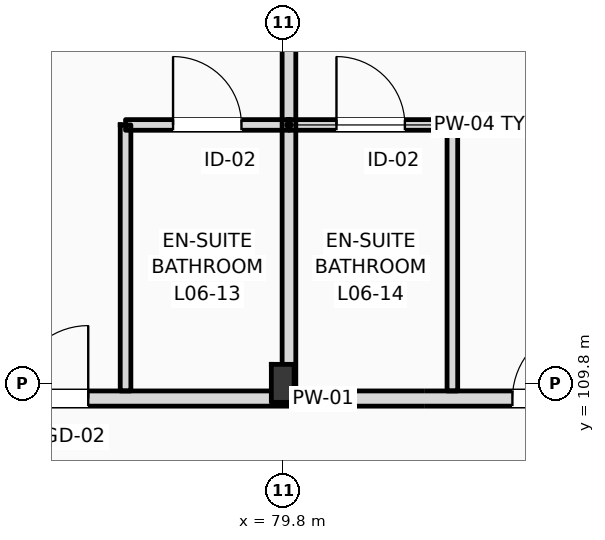
"""IFC4 building model, lengths in metres.
Left out: names, types, materials, properties, quantities, classifications, styles, units other than length and angle.
Written with IfcOpenShell. Run it as: python <this file> out.ifc"""

import sys

from ifc_helpers import new_model, si_unit, direction, frame, frame_2d, origin, origin_2d, place, context, subcontext, project, spatial, rectangle, i_section, extrude, element, fill, save


model = new_model("IFC4")
c1 = context("Model", 3, precision=1e-05, world=origin(), true_north=direction((0.0, 1.0)))
c2 = subcontext(c1, "Body", "Model", "MODEL_VIEW")
j1 = project(units=[si_unit("LENGTHUNIT", "METRE"), si_unit("PLANEANGLEUNIT", "RADIAN")], contexts=[c1])
p1 = place(None, origin())
s1 = spatial("IfcSite", under=j1, at=p1, CompositionType="ELEMENT")
p2 = place(p1, origin())
s2 = spatial("IfcBuilding", under=s1, at=p2, CompositionType="ELEMENT")
p3 = place(p2, frame((0.0, 0.0, 28.2)))
s3 = spatial("IfcBuildingStorey", under=s2, at=p3, CompositionType="ELEMENT", Elevation=28.2)
p4 = place(p3, frame((79.8, 109.8, 0.0), z_axis=(0.0, 0.0, 1.0), x_axis=(1.0, 0.0, 0.0)))
e1 = element("IfcColumn", 1, at=p4, inside=s3, PredefinedType="COLUMN", context=c2, shape_type="SweptSolid", body=[
    extrude(i_section(OverallWidth=0.3, OverallDepth=0.5, WebThickness=0.014, FlangeThickness=0.028, FilletRadius=0.027, at=origin_2d()), origin(), (0.0, 0.0, 1.0), 3.6),
])
p5 = place(p3, frame((10.65, 109.6, 0.0), z_axis=(0.0, 0.0, 1.0), x_axis=(1.0, 0.0, 0.0)))
e2 = element("IfcWall", 2, at=p5, inside=s3, PredefinedType="PARTITIONING", context=c2, shape_type="SweptSolid", body=[
    extrude(rectangle(XDim=109.21, YDim=0.2, at=frame_2d((54.605, 0.0))), origin(), (0.0, 0.0, 1.0), 2.8),
])
p6 = place(p5, frame((12.611, 0.0, 0.0)))
e3 = element("IfcOpeningElement", 3, at=p6, cuts=e2, PredefinedType="OPENING", context=c2, shape_type="SweptSolid", body=[
    extrude(rectangle(XDim=1.02, YDim=2.2, at=frame_2d((0.51, 1.1))), frame((0.0, 0.11, 0.0), z_axis=(0.0, -1.0, 0.0), x_axis=(1.0, 0.0, 0.0)), (0.0, 0.0, 1.0), 0.22),
])
p7 = place(p5, frame((19.451, 0.0, 0.0)))
e4 = element("IfcOpeningElement", 4, at=p7, cuts=e2, PredefinedType="OPENING", context=c2, shape_type="SweptSolid", body=[
    extrude(rectangle(XDim=1.02, YDim=2.2, at=frame_2d((0.51, 1.1))), frame((0.0, 0.11, 0.0), z_axis=(0.0, -1.0, 0.0), x_axis=(1.0, 0.0, 0.0)), (0.0, 0.0, 1.0), 0.22),
])
p8 = place(p5, frame((23.842, 0.0, 0.0)))
e5 = element("IfcOpeningElement", 5, at=p8, cuts=e2, PredefinedType="OPENING", context=c2, shape_type="SweptSolid", body=[
    extrude(rectangle(XDim=1.02, YDim=2.2, at=frame_2d((0.51, 1.1))), frame((0.0, 0.11, 0.0), z_axis=(0.0, -1.0, 0.0), x_axis=(1.0, 0.0, 0.0)), (0.0, 0.0, 1.0), 0.22),
])
p9 = place(p5, frame((26.084, 0.0, 0.0)))
e6 = element("IfcOpeningElement", 6, at=p9, cuts=e2, PredefinedType="OPENING", context=c2, shape_type="SweptSolid", body=[
    extrude(rectangle(XDim=1.02, YDim=2.2, at=frame_2d((0.51, 1.1))), frame((0.0, 0.11, 0.0), z_axis=(0.0, -1.0, 0.0), x_axis=(1.0, 0.0, 0.0)), (0.0, 0.0, 1.0), 0.22),
])
p10 = place(p5, frame((32.655, 0.0, 0.0)))
e7 = element("IfcOpeningElement", 7, at=p10, cuts=e2, PredefinedType="OPENING", context=c2, shape_type="SweptSolid", body=[
    extrude(rectangle(XDim=0.96, YDim=2.2, at=frame_2d((0.48, 1.1))), frame((0.0, 0.11, 0.0), z_axis=(0.0, -1.0, 0.0), x_axis=(1.0, 0.0, 0.0)), (0.0, 0.0, 1.0), 0.22),
])
p11 = place(p5, frame((34.895, 0.0, 0.0)))
e8 = element("IfcOpeningElement", 8, at=p11, cuts=e2, PredefinedType="OPENING", context=c2, shape_type="SweptSolid", body=[
    extrude(rectangle(XDim=0.96, YDim=2.2, at=frame_2d((0.48, 1.1))), frame((0.0, 0.11, 0.0), z_axis=(0.0, -1.0, 0.0), x_axis=(1.0, 0.0, 0.0)), (0.0, 0.0, 1.0), 0.22),
])
p12 = place(p5, frame((41.436, 0.0, 0.0)))
e9 = element("IfcOpeningElement", 9, at=p12, cuts=e2, PredefinedType="OPENING", context=c2, shape_type="SweptSolid", body=[
    extrude(rectangle(XDim=0.96, YDim=2.2, at=frame_2d((0.48, 1.1))), frame((0.0, 0.11, 0.0), z_axis=(0.0, -1.0, 0.0), x_axis=(1.0, 0.0, 0.0)), (0.0, 0.0, 1.0), 0.22),
])
p13 = place(p5, frame((43.427, 0.0, 0.0)))
e10 = element("IfcOpeningElement", 10, at=p13, cuts=e2, PredefinedType="OPENING", context=c2, shape_type="SweptSolid", body=[
    extrude(rectangle(XDim=0.96, YDim=2.2, at=frame_2d((0.48, 1.1))), frame((0.0, 0.11, 0.0), z_axis=(0.0, -1.0, 0.0), x_axis=(1.0, 0.0, 0.0)), (0.0, 0.0, 1.0), 0.22),
])
p14 = place(p5, frame((50.218, 0.0, 0.0)))
e11 = element("IfcOpeningElement", 11, at=p14, cuts=e2, PredefinedType="OPENING", context=c2, shape_type="SweptSolid", body=[
    extrude(rectangle(XDim=0.96, YDim=2.2, at=frame_2d((0.48, 1.1))), frame((0.0, 0.11, 0.0), z_axis=(0.0, -1.0, 0.0), x_axis=(1.0, 0.0, 0.0)), (0.0, 0.0, 1.0), 0.22),
])
p15 = place(p5, frame((54.859, 0.0, 0.0)))
e12 = element("IfcOpeningElement", 12, at=p15, cuts=e2, PredefinedType="OPENING", context=c2, shape_type="SweptSolid", body=[
    extrude(rectangle(XDim=0.96, YDim=2.2, at=frame_2d((0.48, 1.1))), frame((0.0, 0.11, 0.0), z_axis=(0.0, -1.0, 0.0), x_axis=(1.0, 0.0, 0.0)), (0.0, 0.0, 1.0), 0.22),
])
p16 = place(p5, frame((59.0, 0.0, 0.0)))
e13 = element("IfcOpeningElement", 13, at=p16, cuts=e2, PredefinedType="OPENING", context=c2, shape_type="SweptSolid", body=[
    extrude(rectangle(XDim=0.96, YDim=2.2, at=frame_2d((0.48, 1.1))), frame((0.0, 0.11, 0.0), z_axis=(0.0, -1.0, 0.0), x_axis=(1.0, 0.0, 0.0)), (0.0, 0.0, 1.0), 0.22),
])
p17 = place(p5, frame((63.39, 0.0, 0.0)))
e14 = element("IfcOpeningElement", 14, at=p17, cuts=e2, PredefinedType="OPENING", context=c2, shape_type="SweptSolid", body=[
    extrude(rectangle(XDim=0.96, YDim=2.2, at=frame_2d((0.48, 1.1))), frame((0.0, 0.11, 0.0), z_axis=(0.0, -1.0, 0.0), x_axis=(1.0, 0.0, 0.0)), (0.0, 0.0, 1.0), 0.22),
])
p18 = place(p5, frame((65.631, 0.0, 0.0)))
e15 = element("IfcOpeningElement", 15, at=p18, cuts=e2, PredefinedType="OPENING", context=c2, shape_type="SweptSolid", body=[
    extrude(rectangle(XDim=0.96, YDim=2.2, at=frame_2d((0.48, 1.1))), frame((0.0, 0.11, 0.0), z_axis=(0.0, -1.0, 0.0), x_axis=(1.0, 0.0, 0.0)), (0.0, 0.0, 1.0), 0.22),
])
p19 = place(p5, frame((72.172, 0.0, 0.0)))
e16 = element("IfcOpeningElement", 16, at=p19, cuts=e2, PredefinedType="OPENING", context=c2, shape_type="SweptSolid", body=[
    extrude(rectangle(XDim=0.96, YDim=2.2, at=frame_2d((0.48, 1.1))), frame((0.0, 0.11, 0.0), z_axis=(0.0, -1.0, 0.0), x_axis=(1.0, 0.0, 0.0)), (0.0, 0.0, 1.0), 0.22),
])
p20 = place(p5, frame((74.413, 0.0, 0.0)))
e17 = element("IfcOpeningElement", 17, at=p20, cuts=e2, PredefinedType="OPENING", context=c2, shape_type="SweptSolid", body=[
    extrude(rectangle(XDim=0.96, YDim=2.2, at=frame_2d((0.48, 1.1))), frame((0.0, 0.11, 0.0), z_axis=(0.0, -1.0, 0.0), x_axis=(1.0, 0.0, 0.0)), (0.0, 0.0, 1.0), 0.22),
])
p21 = place(p5, frame((80.954, 0.0, 0.0)))
e18 = element("IfcOpeningElement", 18, at=p21, cuts=e2, PredefinedType="OPENING", context=c2, shape_type="SweptSolid", body=[
    extrude(rectangle(XDim=0.96, YDim=2.2, at=frame_2d((0.48, 1.1))), frame((0.0, 0.11, 0.0), z_axis=(0.0, -1.0, 0.0), x_axis=(1.0, 0.0, 0.0)), (0.0, 0.0, 1.0), 0.22),
])
p22 = place(p5, frame((83.195, 0.0, 0.0)))
e19 = element("IfcOpeningElement", 19, at=p22, cuts=e2, PredefinedType="OPENING", context=c2, shape_type="SweptSolid", body=[
    extrude(rectangle(XDim=0.96, YDim=2.2, at=frame_2d((0.48, 1.1))), frame((0.0, 0.11, 0.0), z_axis=(0.0, -1.0, 0.0), x_axis=(1.0, 0.0, 0.0)), (0.0, 0.0, 1.0), 0.22),
])
p23 = place(p5, frame((89.735, 0.0, 0.0)))
e20 = element("IfcOpeningElement", 20, at=p23, cuts=e2, PredefinedType="OPENING", context=c2, shape_type="SweptSolid", body=[
    extrude(rectangle(XDim=0.96, YDim=2.2, at=frame_2d((0.48, 1.1))), frame((0.0, 0.11, 0.0), z_axis=(0.0, -1.0, 0.0), x_axis=(1.0, 0.0, 0.0)), (0.0, 0.0, 1.0), 0.22),
])
p24 = place(p5, frame((94.126, 0.0, 0.0)))
e21 = element("IfcOpeningElement", 21, at=p24, cuts=e2, PredefinedType="OPENING", context=c2, shape_type="SweptSolid", body=[
    extrude(rectangle(XDim=0.96, YDim=2.2, at=frame_2d((0.48, 1.1))), frame((0.0, 0.11, 0.0), z_axis=(0.0, -1.0, 0.0), x_axis=(1.0, 0.0, 0.0)), (0.0, 0.0, 1.0), 0.22),
])
p25 = place(p5, frame((98.517, 0.0, 0.0)))
e22 = element("IfcOpeningElement", 22, at=p25, cuts=e2, PredefinedType="OPENING", context=c2, shape_type="SweptSolid", body=[
    extrude(rectangle(XDim=0.96, YDim=2.2, at=frame_2d((0.48, 1.1))), frame((0.0, 0.11, 0.0), z_axis=(0.0, -1.0, 0.0), x_axis=(1.0, 0.0, 0.0)), (0.0, 0.0, 1.0), 0.22),
])
p26 = place(p5, frame((102.908, 0.0, 0.0)))
e23 = element("IfcOpeningElement", 23, at=p26, cuts=e2, PredefinedType="OPENING", context=c2, shape_type="SweptSolid", body=[
    extrude(rectangle(XDim=0.96, YDim=2.2, at=frame_2d((0.48, 1.1))), frame((0.0, 0.11, 0.0), z_axis=(0.0, -1.0, 0.0), x_axis=(1.0, 0.0, 0.0)), (0.0, 0.0, 1.0), 0.22),
])
p27 = place(p5, frame((105.099, 0.0, 0.0)))
e24 = element("IfcOpeningElement", 24, at=p27, cuts=e2, PredefinedType="OPENING", context=c2, shape_type="SweptSolid", body=[
    extrude(rectangle(XDim=0.96, YDim=2.2, at=frame_2d((0.48, 1.1))), frame((0.0, 0.11, 0.0), z_axis=(0.0, -1.0, 0.0), x_axis=(1.0, 0.0, 0.0)), (0.0, 0.0, 1.0), 0.22),
])
p28 = place(p5, frame((2.716, 0.0, 0.0)))
e25 = element("IfcOpeningElement", 25, at=p28, cuts=e2, PredefinedType="OPENING", context=c2, shape_type="SweptSolid", body=[
    extrude(rectangle(XDim=1.35, YDim=2.25, at=frame_2d((0.675, 1.125))), frame((0.0, 0.11, 0.0), z_axis=(0.0, -1.0, 0.0), x_axis=(1.0, 0.0, 0.0)), (0.0, 0.0, 1.0), 0.22),
])
p29 = place(p5, frame((6.65, 0.0, 0.0)))
e26 = element("IfcOpeningElement", 26, at=p29, cuts=e2, PredefinedType="OPENING", context=c2, shape_type="SweptSolid", body=[
    extrude(rectangle(XDim=1.35, YDim=2.25, at=frame_2d((0.675, 1.125))), frame((0.0, 0.11, 0.0), z_axis=(0.0, -1.0, 0.0), x_axis=(1.0, 0.0, 0.0)), (0.0, 0.0, 1.0), 0.22),
])
p30 = place(p5, frame((10.583, 0.0, 0.0)))
e27 = element("IfcOpeningElement", 27, at=p30, cuts=e2, PredefinedType="OPENING", context=c2, shape_type="SweptSolid", body=[
    extrude(rectangle(XDim=1.35, YDim=2.25, at=frame_2d((0.675, 1.125))), frame((0.0, 0.11, 0.0), z_axis=(0.0, -1.0, 0.0), x_axis=(1.0, 0.0, 0.0)), (0.0, 0.0, 1.0), 0.22),
])
p31 = place(p3, frame((79.882, 109.7, 0.0), z_axis=(0.0, 0.0, 1.0), x_axis=(0.0, 1.0, 0.0)))
e28 = element("IfcWall", 28, at=p31, inside=s3, PredefinedType="PARTITIONING", context=c2, shape_type="SweptSolid", body=[
    extrude(rectangle(XDim=8.15, YDim=0.18, at=frame_2d((4.075, 0.0))), origin(), (0.0, 0.0, 1.0), 2.99),
])
p32 = place(p3, frame((77.732, 109.7, 0.0), z_axis=(0.0, 0.0, 1.0), x_axis=(0.0, 1.0, 0.0)))
e29 = element("IfcWall", 29, at=p32, inside=s3, PredefinedType="PARTITIONING", context=c2, shape_type="SweptSolid", body=[
    extrude(rectangle(XDim=3.5, YDim=0.14, at=frame_2d((1.75, 0.0))), origin(), (0.0, 0.0, 1.0), 3.36),
])
p33 = place(p3, frame((77.732, 113.2, 0.0), z_axis=(0.0, 0.0, 1.0), x_axis=(1.0, 0.0, 0.0)))
e30 = element("IfcWall", 30, at=p33, inside=s3, PredefinedType="PARTITIONING", context=c2, shape_type="SweptSolid", body=[
    extrude(rectangle(XDim=2.15, YDim=0.14, at=frame_2d((1.075, 0.0))), origin(), (0.0, 0.0, 1.0), 3.36),
])
p34 = place(p33, frame((0.625, 0.0, 0.0)))
e31 = element("IfcOpeningElement", 31, at=p34, cuts=e30, PredefinedType="OPENING", context=c2, shape_type="SweptSolid", body=[
    extrude(rectangle(XDim=0.9, YDim=2.1, at=frame_2d((0.45, 1.05))), frame((0.0, 0.08, 0.0), z_axis=(0.0, -1.0, 0.0), x_axis=(1.0, 0.0, 0.0)), (0.0, 0.0, 1.0), 0.16),
])
p35 = place(p3, frame((82.032, 109.7, 0.0), z_axis=(0.0, 0.0, 1.0), x_axis=(0.0, 1.0, 0.0)))
e32 = element("IfcWall", 32, at=p35, inside=s3, PredefinedType="PARTITIONING", context=c2, shape_type="SweptSolid", body=[
    extrude(rectangle(XDim=3.5, YDim=0.14, at=frame_2d((1.75, 0.0))), origin(), (0.0, 0.0, 1.0), 3.36),
])
p36 = place(p3, frame((79.882, 113.2, 0.0), z_axis=(0.0, 0.0, 1.0), x_axis=(1.0, 0.0, 0.0)))
e33 = element("IfcWall", 33, at=p36, inside=s3, PredefinedType="PARTITIONING", context=c2, shape_type="SweptSolid", body=[
    extrude(rectangle(XDim=2.15, YDim=0.14, at=frame_2d((1.075, 0.0))), origin(), (0.0, 0.0, 1.0), 3.36),
])
p37 = place(p36, frame((0.625, 0.0, 0.0)))
e34 = element("IfcOpeningElement", 34, at=p37, cuts=e33, PredefinedType="OPENING", context=c2, shape_type="SweptSolid", body=[
    extrude(rectangle(XDim=0.9, YDim=2.1, at=frame_2d((0.45, 1.05))), frame((0.0, 0.08, 0.0), z_axis=(0.0, -1.0, 0.0), x_axis=(1.0, 0.0, 0.0)), (0.0, 0.0, 1.0), 0.16),
])
p38 = place(p18, origin())
e35 = element("IfcDoor", 35, at=p38, inside=s3, OperationType="SINGLE_SWING_RIGHT", PredefinedType="DOOR", context=c2, shape_type="SweptSolid", body=[
    extrude(rectangle(XDim=0.96, YDim=2.2, at=frame_2d((0.48, 1.1))), frame((0.0, 0.025, 0.0), z_axis=(0.0, -1.0, 0.0), x_axis=(1.0, 0.0, 0.0)), (0.0, 0.0, 1.0), 0.05),
])
fill(e15, e35)
p39 = place(p34, origin())
e36 = element("IfcDoor", 36, at=p39, inside=s3, OperationType="SINGLE_SWING_LEFT", PredefinedType="DOOR", context=c2, shape_type="SweptSolid", body=[
    extrude(rectangle(XDim=0.9, YDim=2.1, at=frame_2d((0.45, 1.05))), frame((0.0, 0.025, 0.0), z_axis=(0.0, -1.0, 0.0), x_axis=(1.0, 0.0, 0.0)), (0.0, 0.0, 1.0), 0.05),
])
fill(e31, e36)
p40 = place(p19, origin())
e37 = element("IfcDoor", 37, at=p40, inside=s3, OperationType="SINGLE_SWING_RIGHT", PredefinedType="DOOR", context=c2, shape_type="SweptSolid", body=[
    extrude(rectangle(XDim=0.96, YDim=2.2, at=frame_2d((0.48, 1.1))), frame((0.0, 0.025, 0.0), z_axis=(0.0, -1.0, 0.0), x_axis=(1.0, 0.0, 0.0)), (0.0, 0.0, 1.0), 0.05),
])
fill(e16, e37)
p41 = place(p37, origin())
e38 = element("IfcDoor", 38, at=p41, inside=s3, OperationType="SINGLE_SWING_LEFT", PredefinedType="DOOR", context=c2, shape_type="SweptSolid", body=[
    extrude(rectangle(XDim=0.9, YDim=2.1, at=frame_2d((0.45, 1.05))), frame((0.0, 0.025, 0.0), z_axis=(0.0, -1.0, 0.0), x_axis=(1.0, 0.0, 0.0)), (0.0, 0.0, 1.0), 0.05),
])
fill(e34, e38)
save(model, sys.argv[1])
